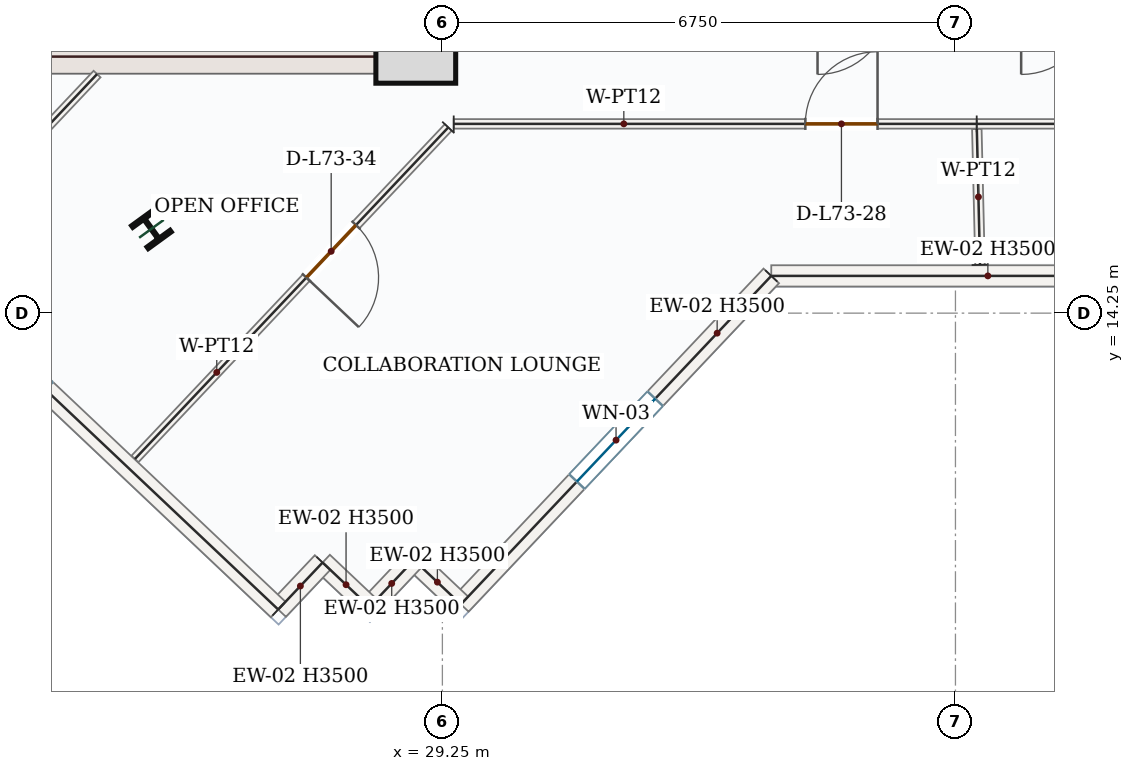
"""IFC4 building model, lengths in metres.
Left out: names, types, materials, properties, quantities, classifications, styles, units other than length and angle.
Written with IfcOpenShell. Run it as: python <this file> out.ifc"""

import sys

from ifc_helpers import new_model, si_unit, direction, frame, frame_2d, origin, origin_2d, place, context, subcontext, project, spatial, rectangle, i_section, extrude, source, transform, mapped, element, fill, save


model = new_model("IFC4")
c1 = context("Model", 3, precision=1e-05, world=origin(), true_north=direction((0.0, 1.0)))
c2 = subcontext(c1, "Body", "Model", "MODEL_VIEW")
j1 = project(units=[si_unit("LENGTHUNIT", "METRE"), si_unit("PLANEANGLEUNIT", "RADIAN")], contexts=[c1])
p1 = place(None, origin())
s1 = spatial("IfcSite", under=j1, at=p1, CompositionType="ELEMENT")
p2 = place(p1, origin())
s2 = spatial("IfcBuilding", under=s1, at=p2, CompositionType="ELEMENT")
p3 = place(p2, frame((0.0, 0.0, 302.85)))
s3 = spatial("IfcBuildingStorey", under=s2, at=p3, CompositionType="ELEMENT", Elevation=302.85)
p4 = place(p3, frame((29.025, 17.4, 0.0), z_axis=(0.0, 0.0, 1.0), x_axis=(0.0, 1.0, 0.0)))
e1 = element("IfcWall", 1, at=p4, inside=s3, PredefinedType="SHEAR", context=c2, shape_type="SweptSolid", body=[
    extrude(rectangle(XDim=8.55, YDim=0.45, at=frame_2d((4.275, 0.0))), origin(), (0.0, 0.0, 1.0), 3.5),
])
p5 = place(p4, frame((6.65, 0.0, 0.0)))
e2 = element("IfcOpeningElement", 2, at=p5, cuts=e1, PredefinedType="OPENING", context=c2, shape_type="SweptSolid", body=[
    extrude(rectangle(XDim=1.1, YDim=2.2, at=frame_2d((0.55, 1.1))), frame((0.0, 0.235, 0.0), z_axis=(0.0, -1.0, 0.0), x_axis=(1.0, 0.0, 0.0)), (0.0, 0.0, 1.0), 0.47),
])
p6 = place(p4, frame((2.7, 0.0, 0.0)))
e3 = element("IfcOpeningElement", 3, at=p6, cuts=e1, PredefinedType="OPENING", context=c2, shape_type="SweptSolid", body=[
    extrude(rectangle(XDim=0.88, YDim=2.1, at=frame_2d((0.44, 1.05))), frame((0.0, 0.235, 0.0), z_axis=(0.0, -1.0, 0.0), x_axis=(1.0, 0.0, 0.0)), (0.0, 0.0, 1.0), 0.47),
])
p7 = place(p4, frame((4.6, 0.0, 0.0)))
e4 = element("IfcOpeningElement", 4, at=p7, cuts=e1, PredefinedType="OPENING", context=c2, shape_type="SweptSolid", body=[
    extrude(rectangle(XDim=0.88, YDim=2.1, at=frame_2d((0.44, 1.05))), frame((0.0, 0.235, 0.0), z_axis=(0.0, -1.0, 0.0), x_axis=(1.0, 0.0, 0.0)), (0.0, 0.0, 1.0), 0.47),
])
m1 = source(origin(), c2, "Body", "SweptSolid", [
    extrude(rectangle(XDim=7.1, YDim=0.45, at=frame_2d((3.55, 0.0))), origin(), (0.0, 0.0, 1.0), 3.5),
])
p8 = place(p3, frame((21.7, 17.625, 0.0), z_axis=(0.0, 0.0, 1.0), x_axis=(1.0, 0.0, 0.0)))
e5 = element("IfcWall", 5, at=p8, inside=s3, PredefinedType="SHEAR", context=c2, shape_type="MappedRepresentation", body=[
    mapped(m1, transform((0.0, 0.0, 0.0), x_axis=(1.0, 0.0, 0.0), y_axis=(0.0, 1.0, 0.0), z_axis=(0.0, 0.0, 1.0), scale=1.0)),
])
m2 = source(origin(), c2, "Body", "SweptSolid", [
    extrude(rectangle(XDim=1.05, YDim=1.05, at=origin_2d()), origin(), (0.0, 0.0, 1.0), 3.75),
])
p9 = place(p3, frame((28.9, 17.8, 0.0), z_axis=(0.0, 0.0, 1.0), x_axis=(1.0, 0.0, 0.0)))
e6 = element("IfcColumn", 6, at=p9, inside=s3, PredefinedType="COLUMN", context=c2, shape_type="MappedRepresentation", body=[
    mapped(m2, transform((0.0, 0.0, 0.0), x_axis=(1.0, 0.0, 0.0), y_axis=(0.0, 1.0, 0.0), z_axis=(0.0, 0.0, 1.0), scale=1.0)),
])
m3 = source(origin(), c2, "Body", "SweptSolid", [
    extrude(i_section(OverallWidth=0.374, OverallDepth=0.372, WebThickness=0.016, FlangeThickness=0.026, FilletRadius=0.018, at=origin_2d()), origin(), (0.0, 0.0, 1.0), 3.75),
])
p10 = place(p3, frame((25.422, 15.359, 0.0), z_axis=(0.0, 0.0, 1.0), x_axis=(0.809016994375, 0.587785252292, 0.0)))
e7 = element("IfcColumn", 7, at=p10, inside=s3, PredefinedType="COLUMN", context=c2, shape_type="MappedRepresentation", body=[
    mapped(m3, transform((0.0, 0.0, 0.0), x_axis=(1.0, 0.0, 0.0), y_axis=(0.0, 1.0, 0.0), z_axis=(0.0, 0.0, 1.0), scale=1.0)),
])
m4 = source(origin(), c2, "Body", "SweptSolid", [
    extrude(rectangle(XDim=5.699, YDim=0.28, at=frame_2d((2.85, 0.0))), origin(), (0.0, 0.0, 1.0), 3.5),
])
p11 = place(p3, frame((39.276, 14.74, 0.0), z_axis=(0.0, 0.0, 1.0), x_axis=(-1.0, 0.0, 0.0)))
e8 = element("IfcWall", 8, at=p11, inside=s3, PredefinedType="SOLIDWALL", context=c2, shape_type="MappedRepresentation", body=[
    mapped(m4, transform((0.0, 0.0, 0.0), x_axis=(1.0, 0.0, 0.0), y_axis=(0.0, 1.0, 0.0), z_axis=(0.0, 0.0, 1.0), scale=1.0)),
])
p12 = place(p3, frame((33.577, 14.74, 0.0), z_axis=(0.0, 0.0, 1.0), x_axis=(-0.686888766374, -0.72676256276, 0.0)))
e9 = element("IfcWall", 9, at=p12, inside=s3, PredefinedType="SOLIDWALL", context=c2, shape_type="SweptSolid", body=[
    extrude(rectangle(XDim=5.945, YDim=0.28, at=frame_2d((2.973, 0.0))), origin(), (0.0, 0.0, 1.0), 3.5),
])
p13 = place(p12, frame((2.223, 0.0, 0.85)))
e10 = element("IfcOpeningElement", 10, at=p13, cuts=e9, PredefinedType="OPENING", context=c2, shape_type="SweptSolid", body=[
    extrude(rectangle(XDim=1.5, YDim=1.5, at=frame_2d((0.75, 0.75))), frame((0.0, 0.15, 0.0), z_axis=(0.0, -1.0, 0.0), x_axis=(1.0, 0.0, 0.0)), (0.0, 0.0, 1.0), 0.3),
])
m5 = source(origin(), c2, "Body", "SweptSolid", [
    extrude(rectangle(XDim=0.85, YDim=0.28, at=frame_2d((0.425, 0.0))), origin(), (0.0, 0.0, 1.0), 3.5),
])
p14 = place(p3, frame((29.493, 10.419, 0.0), z_axis=(0.0, 0.0, 1.0), x_axis=(-0.726790047388, 0.686859685101, 0.0)))
e11 = element("IfcWall", 11, at=p14, inside=s3, PredefinedType="SOLIDWALL", context=c2, shape_type="MappedRepresentation", body=[
    mapped(m5, transform((0.0, 0.0, 0.0), x_axis=(1.0, 0.0, 0.0), y_axis=(0.0, 1.0, 0.0), z_axis=(0.0, 0.0, 1.0), scale=1.0)),
])
m6 = source(origin(), c2, "Body", "SweptSolid", [
    extrude(rectangle(XDim=0.85, YDim=0.28, at=frame_2d((0.425, 0.0))), origin(), (0.0, 0.0, 1.0), 3.5),
])
p15 = place(p3, frame((28.875, 11.003, 0.0), z_axis=(0.0, 0.0, 1.0), x_axis=(-0.687011382404, -0.726646654466, 0.0)))
e12 = element("IfcWall", 12, at=p15, inside=s3, PredefinedType="SOLIDWALL", context=c2, shape_type="MappedRepresentation", body=[
    mapped(m6, transform((0.0, 0.0, 0.0), x_axis=(1.0, 0.0, 0.0), y_axis=(0.0, 1.0, 0.0), z_axis=(0.0, 0.0, 1.0), scale=1.0)),
])
p16 = place(p3, frame((28.292, 10.385, 0.0), z_axis=(0.0, 0.0, 1.0), x_axis=(-0.726790047388, 0.686859685101, 0.0)))
e13 = element("IfcWall", 13, at=p16, inside=s3, PredefinedType="SOLIDWALL", context=c2, shape_type="MappedRepresentation", body=[
    mapped(m5, transform((0.0, 0.0, 0.0), x_axis=(1.0, 0.0, 0.0), y_axis=(0.0, 1.0, 0.0), z_axis=(0.0, 0.0, 1.0), scale=1.0)),
])
p17 = place(p3, frame((27.674, 10.969, 0.0), z_axis=(0.0, 0.0, 1.0), x_axis=(-0.687011382404, -0.726646654466, 0.0)))
e14 = element("IfcWall", 14, at=p17, inside=s3, PredefinedType="SOLIDWALL", context=c2, shape_type="MappedRepresentation", body=[
    mapped(m6, transform((0.0, 0.0, 0.0), x_axis=(1.0, 0.0, 0.0), y_axis=(0.0, 1.0, 0.0), z_axis=(0.0, 0.0, 1.0), scale=1.0)),
])
p18 = place(p3, frame((27.09, 10.351, 0.0), z_axis=(0.0, 0.0, 1.0), x_axis=(-0.726772856404, 0.686877875022, 0.0)))
e15 = element("IfcWall", 15, at=p18, inside=s3, PredefinedType="SOLIDWALL", context=c2, shape_type="SweptSolid", body=[
    extrude(rectangle(XDim=9.92, YDim=0.28, at=frame_2d((4.96, 0.0))), origin(), (0.0, 0.0, 1.0), 3.5),
])
p19 = place(p18, frame((4.21, 0.0, 0.85)))
e16 = element("IfcOpeningElement", 16, at=p19, cuts=e15, PredefinedType="OPENING", context=c2, shape_type="SweptSolid", body=[
    extrude(rectangle(XDim=1.5, YDim=1.5, at=frame_2d((0.75, 0.75))), frame((0.0, 0.15, 0.0), z_axis=(0.0, -1.0, 0.0), x_axis=(1.0, 0.0, 0.0)), (0.0, 0.0, 1.0), 0.3),
])
m7 = source(origin(), c2, "Body", "SweptSolid", [
    extrude(rectangle(XDim=3.337, YDim=0.125, at=frame_2d((1.669, 0.0))), origin(), (0.0, 0.0, 1.0), 3.5),
])
p20 = place(p3, frame((22.415, 14.969, 0.0), z_axis=(0.0, 0.0, 1.0), x_axis=(0.686891986515, 0.726759519278, 0.0)))
e17 = element("IfcWall", 17, at=p20, inside=s3, PredefinedType="PARTITIONING", context=c2, shape_type="MappedRepresentation", body=[
    mapped(m7, transform((0.0, 0.0, 0.0), x_axis=(1.0, 0.0, 0.0), y_axis=(0.0, 1.0, 0.0), z_axis=(0.0, 0.0, 1.0), scale=1.0)),
])
p21 = place(p3, frame((29.328, 16.694, 0.0), z_axis=(0.0, 0.0, 1.0), x_axis=(-0.686871949206, -0.726778456886, 0.0)))
e18 = element("IfcWall", 18, at=p21, inside=s3, PredefinedType="PARTITIONING", context=c2, shape_type="SweptSolid", body=[
    extrude(rectangle(XDim=6.001, YDim=0.125, at=frame_2d((3.001, 0.0))), origin(), (0.0, 0.0, 1.0), 3.5),
])
p22 = place(p21, frame((1.768, 0.0, 0.0)))
e19 = element("IfcOpeningElement", 19, at=p22, cuts=e18, PredefinedType="OPENING", context=c2, shape_type="SweptSolid", body=[
    extrude(rectangle(XDim=0.95, YDim=2.15, at=frame_2d((0.475, 1.075))), frame((0.0, 0.073, 0.0), z_axis=(0.0, -1.0, 0.0), x_axis=(1.0, 0.0, 0.0)), (0.0, 0.0, 1.0), 0.145),
])
p23 = place(p3, frame((36.28, 16.74, 0.0), z_axis=(0.0, 0.0, 1.0), x_axis=(1.0, 0.0, 0.0)))
e20 = element("IfcWall", 20, at=p23, inside=s3, PredefinedType="PARTITIONING", context=c2, shape_type="SweptSolid", body=[
    extrude(rectangle(XDim=6.464, YDim=0.125, at=frame_2d((3.232, 0.0))), origin(), (0.0, 0.0, 1.0), 3.5),
])
p24 = place(p23, frame((1.213, 0.0, 0.0)))
e21 = element("IfcOpeningElement", 21, at=p24, cuts=e20, PredefinedType="OPENING", context=c2, shape_type="SweptSolid", body=[
    extrude(rectangle(XDim=0.95, YDim=2.15, at=frame_2d((0.475, 1.075))), frame((0.0, 0.073, 0.0), z_axis=(0.0, -1.0, 0.0), x_axis=(1.0, 0.0, 0.0)), (0.0, 0.0, 1.0), 0.145),
])
m8 = source(origin(), c2, "Body", "SweptSolid", [
    extrude(rectangle(XDim=1.788, YDim=0.125, at=frame_2d((0.894, 0.0))), origin(), (0.0, 0.0, 1.0), 3.5),
])
p25 = place(p3, frame((36.323, 14.885, 0.0), z_axis=(0.0, 0.0, 1.0), x_axis=(-0.023484370815, 0.999724204132, 0.0)))
e22 = element("IfcWall", 22, at=p25, inside=s3, PredefinedType="PARTITIONING", context=c2, shape_type="MappedRepresentation", body=[
    mapped(m8, transform((0.0, 0.0, 0.0), x_axis=(1.0, 0.0, 0.0), y_axis=(0.0, 1.0, 0.0), z_axis=(0.0, 0.0, 1.0), scale=1.0)),
])
p26 = place(p3, frame((29.399, 16.74, 0.0), z_axis=(0.0, 0.0, 1.0), x_axis=(1.0, 0.0, 0.0)))
e23 = element("IfcWall", 23, at=p26, inside=s3, PredefinedType="PARTITIONING", context=c2, shape_type="SweptSolid", body=[
    extrude(rectangle(XDim=6.881, YDim=0.125, at=frame_2d((3.44, 0.0))), origin(), (0.0, 0.0, 1.0), 3.5),
])
p27 = place(p26, frame((4.626, 0.0, 0.0)))
e24 = element("IfcOpeningElement", 24, at=p27, cuts=e23, PredefinedType="OPENING", context=c2, shape_type="SweptSolid", body=[
    extrude(rectangle(XDim=0.95, YDim=2.15, at=frame_2d((0.475, 1.075))), frame((0.0, 0.073, 0.0), z_axis=(0.0, -1.0, 0.0), x_axis=(1.0, 0.0, 0.0)), (0.0, 0.0, 1.0), 0.145),
])
m9 = source(origin(), c2, "Body", "SweptSolid", [
    extrude(rectangle(XDim=1.5, YDim=1.5, at=frame_2d((0.75, 0.75))), frame((0.0, 0.03, 0.0), z_axis=(0.0, -1.0, 0.0), x_axis=(1.0, 0.0, 0.0)), (0.0, 0.0, 1.0), 0.06),
])
p28 = place(p13, origin())
e25 = element("IfcWindow", 25, at=p28, inside=s3, PartitioningType="SINGLE_PANEL", PredefinedType="WINDOW", context=c2, shape_type="MappedRepresentation", body=[
    mapped(m9, transform((0.0, 0.0, 0.0), x_axis=(1.0, 0.0, 0.0), y_axis=(0.0, 1.0, 0.0), z_axis=(0.0, 0.0, 1.0), scale=1.0)),
])
fill(e10, e25)
m10 = source(origin(), c2, "Body", "SweptSolid", [
    extrude(rectangle(XDim=0.95, YDim=2.15, at=frame_2d((0.475, 1.075))), frame((0.0, 0.025, 0.0), z_axis=(0.0, -1.0, 0.0), x_axis=(1.0, 0.0, 0.0)), (0.0, 0.0, 1.0), 0.05),
])
p29 = place(p27, origin())
e26 = element("IfcDoor", 26, at=p29, inside=s3, OperationType="SINGLE_SWING_RIGHT", PredefinedType="DOOR", context=c2, shape_type="MappedRepresentation", body=[
    mapped(m10, transform((0.0, 0.0, 0.0), x_axis=(1.0, 0.0, 0.0), y_axis=(0.0, 1.0, 0.0), z_axis=(0.0, 0.0, 1.0), scale=1.0)),
])
fill(e24, e26)
p30 = place(p22, origin())
e27 = element("IfcDoor", 27, at=p30, inside=s3, OperationType="SINGLE_SWING_RIGHT", PredefinedType="DOOR", context=c2, shape_type="MappedRepresentation", body=[
    mapped(m10, transform((0.0, 0.0, 0.0), x_axis=(1.0, 0.0, 0.0), y_axis=(0.0, 1.0, 0.0), z_axis=(0.0, 0.0, 1.0), scale=1.0)),
])
fill(e19, e27)
save(model, sys.argv[1])
